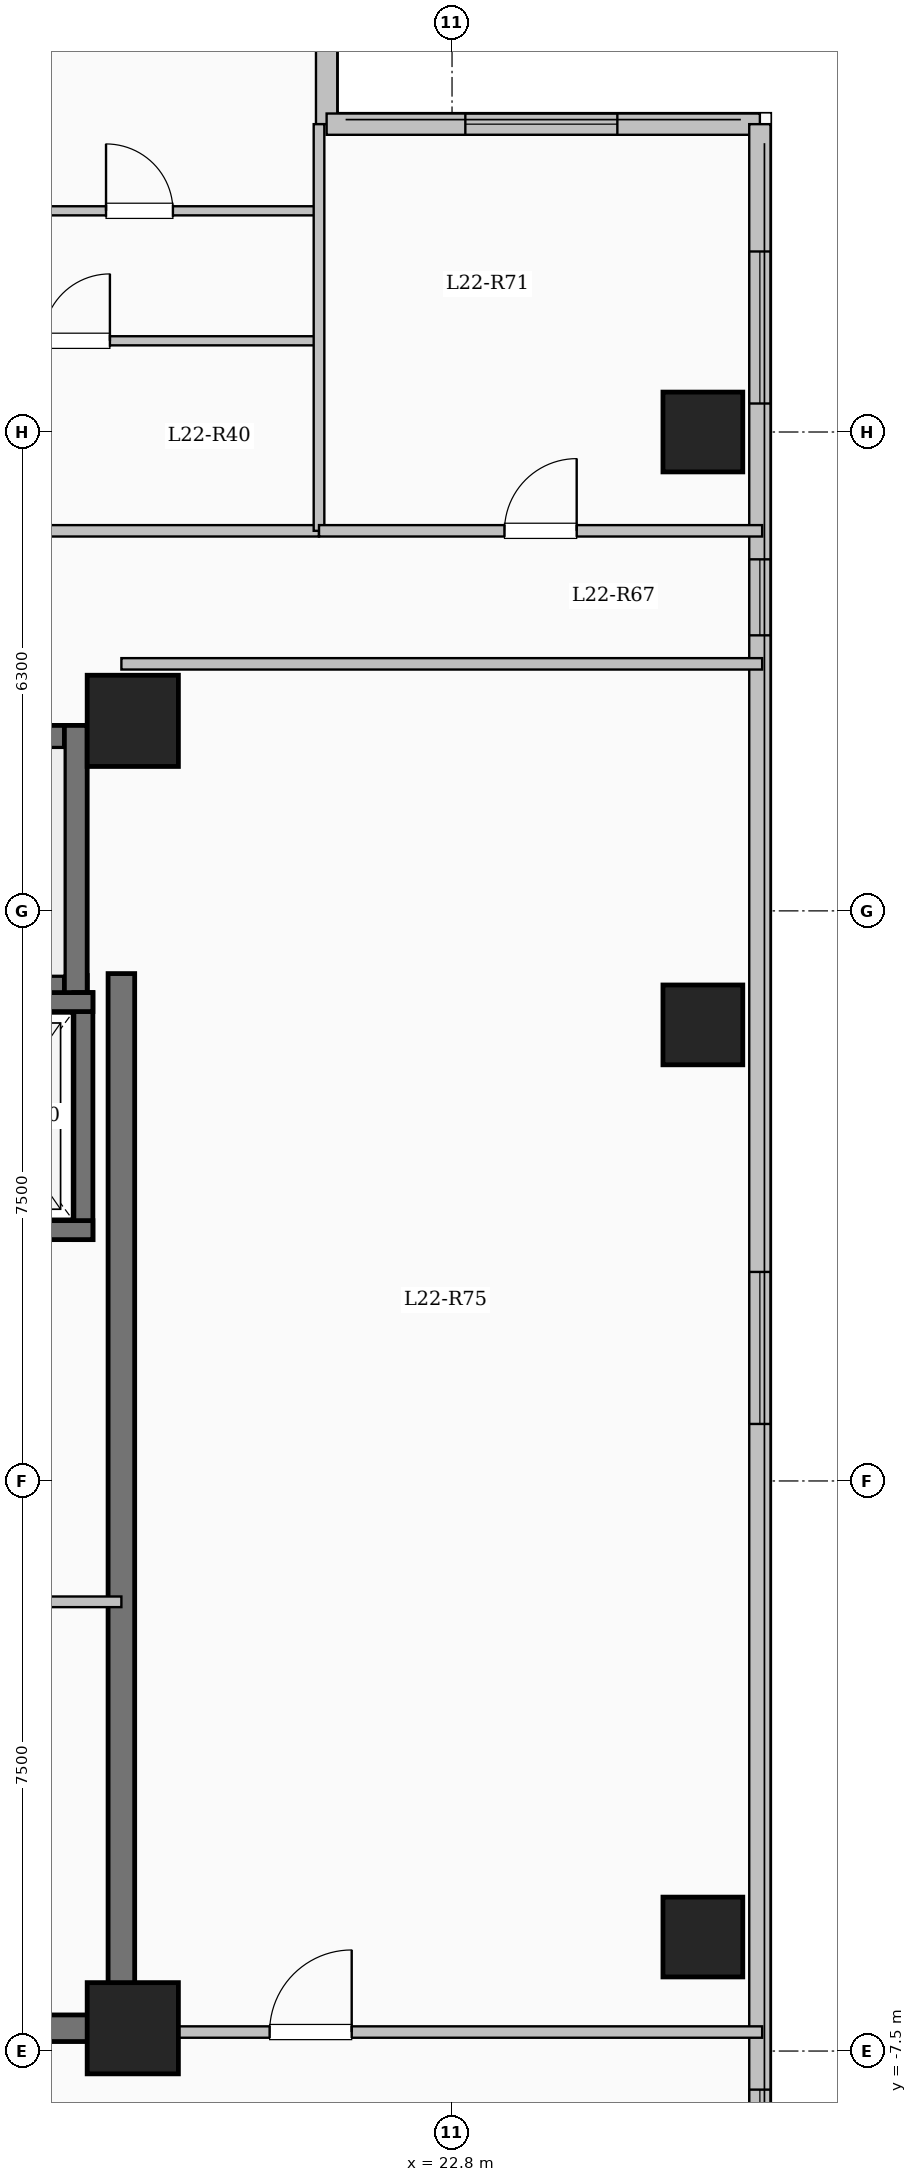
"""IFC4 building model, lengths in metres.
Left out: names, types, materials, properties, quantities, classifications, styles, units other than length and angle.
Written with IfcOpenShell. Run it as: python <this file> out.ifc"""

import sys

from ifc_helpers import new_model, si_unit, direction, frame, frame_2d, origin, origin_2d, place, context, subcontext, project, spatial, rectangle, extrude, element, fill, save


model = new_model("IFC4")
c1 = context("Model", 3, precision=1e-05, world=origin(), true_north=direction((0.0, 1.0)))
c2 = subcontext(c1, "Body", "Model", "MODEL_VIEW")
j1 = project(units=[si_unit("LENGTHUNIT", "METRE"), si_unit("PLANEANGLEUNIT", "RADIAN")], contexts=[c1])
p1 = place(None, origin())
s1 = spatial("IfcSite", under=j1, at=p1, CompositionType="ELEMENT")
p2 = place(p1, origin())
s2 = spatial("IfcBuilding", under=s1, at=p2, CompositionType="ELEMENT")
p3 = place(p2, frame((0.0, 0.0, 85.0)))
s3 = spatial("IfcBuildingStorey", under=s2, at=p3, CompositionType="ELEMENT", Elevation=85.0)
for number, where, z_axis, x_axis in (
    (1, (18.6, -7.2, 0.0), (0.0, 0.0, 1.0), (1.0, 0.0, 0.0)),
    (2, (18.6, 10.0, 0.0), (0.0, 0.0, 1.0), (1.0, 0.0, 0.0)),
):
    element("IfcColumn", number, at=place(p3, frame(where, z_axis=z_axis, x_axis=x_axis)), inside=s3, PredefinedType="COLUMN", context=c2, shape_type="SweptSolid", body=[
        extrude(rectangle(XDim=1.2, YDim=1.2, at=origin_2d()), origin(), (0.0, 0.0, 1.0), 3.35),
    ])
for number, where, z_axis, x_axis in (
    (3, (26.1, -6.0, 0.0), (0.0, 0.0, 1.0), (1.0, 0.0, 0.0)),
    (4, (26.1, 6.0, 0.0), (0.0, 0.0, 1.0), (1.0, 0.0, 0.0)),
    (5, (26.1, 13.8, 0.0), (0.0, 0.0, 1.0), (1.0, 0.0, 0.0)),
):
    element("IfcColumn", number, at=place(p3, frame(where, z_axis=z_axis, x_axis=x_axis)), inside=s3, PredefinedType="COLUMN", context=c2, shape_type="SweptSolid", body=[
        extrude(rectangle(XDim=1.05, YDim=1.05, at=origin_2d()), origin(), (0.0, 0.0, 1.0), 3.35),
    ])
p4 = place(p3, frame((21.15, 22.05, 0.0), z_axis=(0.0, 0.0, 1.0), x_axis=(0.0, -1.0, 0.0)))
e6 = element("IfcWall", 6, at=p4, inside=s3, PredefinedType="SOLIDWALL", context=c2, shape_type="SweptSolid", body=[
    extrude(rectangle(XDim=4.2, YDim=0.28, at=frame_2d((2.1, 0.0))), origin(), (0.0, 0.0, 1.0), 3.1),
])
p5 = place(p4, frame((1.218, 0.0, 0.9)))
e7 = element("IfcOpeningElement", 7, at=p5, cuts=e6, PredefinedType="OPENING", context=c2, shape_type="SweptSolid", body=[
    extrude(rectangle(XDim=1.8, YDim=1.65, at=frame_2d((0.9, 0.825))), frame((0.0, 0.15, 0.0), z_axis=(0.0, -1.0, 0.0), x_axis=(1.0, 0.0, 0.0)), (0.0, 0.0, 1.0), 0.3),
])
p6 = place(p3, frame((21.15, 17.85, 0.0), z_axis=(0.0, 0.0, 1.0), x_axis=(1.0, 0.0, 0.0)))
e8 = element("IfcWall", 8, at=p6, inside=s3, PredefinedType="SOLIDWALL", context=c2, shape_type="SweptSolid", body=[
    extrude(rectangle(XDim=5.7, YDim=0.28, at=frame_2d((2.85, 0.0))), origin(), (0.0, 0.0, 1.0), 3.1),
])
p7 = place(p6, frame((1.825, 0.0, 0.9)))
e9 = element("IfcOpeningElement", 9, at=p7, cuts=e8, PredefinedType="OPENING", context=c2, shape_type="SweptSolid", body=[
    extrude(rectangle(XDim=2.0, YDim=1.7, at=frame_2d((1.0, 0.85))), frame((0.0, 0.15, 0.0), z_axis=(0.0, -1.0, 0.0), x_axis=(1.0, 0.0, 0.0)), (0.0, 0.0, 1.0), 0.3),
])
p8 = place(p3, frame((26.85, 17.85, 0.0), z_axis=(0.0, 0.0, 1.0), x_axis=(0.0, -1.0, 0.0)))
e10 = element("IfcWall", 10, at=p8, inside=s3, PredefinedType="SOLIDWALL", context=c2, shape_type="SweptSolid", body=[
    extrude(rectangle(XDim=35.7, YDim=0.28, at=frame_2d((17.85, 0.0))), origin(), (0.0, 0.0, 1.0), 3.1),
])
p9 = place(p8, frame((1.675, 0.0, 0.9)))
e11 = element("IfcOpeningElement", 11, at=p9, cuts=e10, PredefinedType="OPENING", context=c2, shape_type="SweptSolid", body=[
    extrude(rectangle(XDim=2.0, YDim=1.7, at=frame_2d((1.0, 0.85))), frame((0.0, 0.15, 0.0), z_axis=(0.0, -1.0, 0.0), x_axis=(1.0, 0.0, 0.0)), (0.0, 0.0, 1.0), 0.3),
])
p10 = place(p8, frame((5.725, 0.0, 0.95)))
e12 = element("IfcOpeningElement", 12, at=p10, cuts=e10, PredefinedType="OPENING", context=c2, shape_type="SweptSolid", body=[
    extrude(rectangle(XDim=1.0, YDim=1.5, at=frame_2d((0.5, 0.75))), frame((0.0, 0.15, 0.0), z_axis=(0.0, -1.0, 0.0), x_axis=(1.0, 0.0, 0.0)), (0.0, 0.0, 1.0), 0.3),
])
p11 = place(p8, frame((15.1, 0.0, 0.9)))
e13 = element("IfcOpeningElement", 13, at=p11, cuts=e10, PredefinedType="OPENING", context=c2, shape_type="SweptSolid", body=[
    extrude(rectangle(XDim=2.0, YDim=1.7, at=frame_2d((1.0, 0.85))), frame((0.0, 0.15, 0.0), z_axis=(0.0, -1.0, 0.0), x_axis=(1.0, 0.0, 0.0)), (0.0, 0.0, 1.0), 0.3),
])
p12 = place(p8, frame((25.857, 0.0, 0.9)))
e14 = element("IfcOpeningElement", 14, at=p12, cuts=e10, PredefinedType="OPENING", context=c2, shape_type="SweptSolid", body=[
    extrude(rectangle(XDim=1.5, YDim=1.65, at=frame_2d((0.75, 0.825))), frame((0.0, 0.15, 0.0), z_axis=(0.0, -1.0, 0.0), x_axis=(1.0, 0.0, 0.0)), (0.0, 0.0, 1.0), 0.3),
])
p13 = place(p8, frame((30.75, 0.0, 0.9)))
e15 = element("IfcOpeningElement", 15, at=p13, cuts=e10, PredefinedType="OPENING", context=c2, shape_type="SweptSolid", body=[
    extrude(rectangle(XDim=2.4, YDim=1.8, at=frame_2d((1.2, 0.9))), frame((0.0, 0.15, 0.0), z_axis=(0.0, -1.0, 0.0), x_axis=(1.0, 0.0, 0.0)), (0.0, 0.0, 1.0), 0.3),
])
p14 = place(p3, frame((10.0, 9.79, 0.0), z_axis=(0.0, 0.0, 1.0), x_axis=(1.0, 0.0, 0.0)))
e16 = element("IfcWall", 16, at=p14, inside=s3, PredefinedType="SHEAR", context=c2, shape_type="SweptSolid", body=[
    extrude(rectangle(XDim=8.0, YDim=0.3, at=frame_2d((4.0, 0.0))), origin(), (0.0, 0.0, 1.0), 3.35),
])
p15 = place(p3, frame((10.0, 6.5, 0.0), z_axis=(0.0, 0.0, 1.0), x_axis=(1.0, 0.0, 0.0)))
e17 = element("IfcWall", 17, at=p15, inside=s3, PredefinedType="SHEAR", context=c2, shape_type="SweptSolid", body=[
    extrude(rectangle(XDim=8.0, YDim=0.3, at=frame_2d((4.0, 0.0))), origin(), (0.0, 0.0, 1.0), 3.35),
])
p16 = place(p15, frame((0.55, 0.0, 0.0)))
e18 = element("IfcOpeningElement", 18, at=p16, cuts=e17, PredefinedType="OPENING", context=c2, shape_type="SweptSolid", body=[
    extrude(rectangle(XDim=1.0, YDim=2.15, at=frame_2d((0.5, 1.075))), frame((0.0, 0.16, 0.0), z_axis=(0.0, -1.0, 0.0), x_axis=(1.0, 0.0, 0.0)), (0.0, 0.0, 1.0), 0.32),
])
p17 = place(p3, frame((17.85, 6.35, 0.0), z_axis=(0.0, 0.0, 1.0), x_axis=(0.0, 1.0, 0.0)))
e19 = element("IfcWall", 19, at=p17, inside=s3, PredefinedType="SHEAR", context=c2, shape_type="SweptSolid", body=[
    extrude(rectangle(XDim=3.59, YDim=0.3, at=frame_2d((1.795, 0.0))), origin(), (0.0, 0.0, 1.0), 3.35),
])
p18 = place(p3, frame((17.95, 3.175, 0.0), z_axis=(0.0, 0.0, 1.0), x_axis=(0.0, 1.0, 0.0)))
e20 = element("IfcWall", 20, at=p18, inside=s3, PredefinedType="SHEAR", context=c2, shape_type="SweptSolid", body=[
    extrude(rectangle(XDim=3.25, YDim=0.25, at=frame_2d((1.625, 0.0))), origin(), (0.0, 0.0, 1.0), 3.35),
])
for number, where, z_axis, x_axis in (
    (21, (15.525, 3.3, 0.0), (0.0, 0.0, 1.0), (1.0, 0.0, 0.0)),
    (22, (15.525, 6.3, 0.0), (0.0, 0.0, 1.0), (1.0, 0.0, 0.0)),
):
    element("IfcWall", number, at=place(p3, frame(where, z_axis=z_axis, x_axis=x_axis)), inside=s3, PredefinedType="SHEAR", context=c2, shape_type="SweptSolid", body=[
        extrude(rectangle(XDim=2.55, YDim=0.25, at=frame_2d((1.275, 0.0))), origin(), (0.0, 0.0, 1.0), 3.35),
    ])
p19 = place(p3, frame((18.45, -7.375, 0.0), z_axis=(0.0, 0.0, 1.0), x_axis=(0.0, 1.0, 0.0)))
e23 = element("IfcWall", 23, at=p19, inside=s3, PredefinedType="SHEAR", context=c2, shape_type="SweptSolid", body=[
    extrude(rectangle(XDim=14.05, YDim=0.35, at=frame_2d((7.025, 0.0))), origin(), (0.0, 0.0, 1.0), 3.35),
])
p20 = place(p3, frame((10.075, -7.2, 0.0), z_axis=(0.0, 0.0, 1.0), x_axis=(1.0, 0.0, 0.0)))
e24 = element("IfcWall", 24, at=p20, inside=s3, PredefinedType="SHEAR", context=c2, shape_type="SweptSolid", body=[
    extrude(rectangle(XDim=8.55, YDim=0.35, at=frame_2d((4.275, 0.0))), origin(), (0.0, 0.0, 1.0), 3.35),
])
p21 = place(p3, frame((15.4, -1.59, 0.0), z_axis=(0.0, 0.0, 1.0), x_axis=(1.0, 0.0, 0.0)))
e25 = element("IfcWall", 25, at=p21, inside=s3, PredefinedType="PARTITIONING", context=c2, shape_type="SweptSolid", body=[
    extrude(rectangle(XDim=3.05, YDim=0.14, at=frame_2d((1.525, 0.0))), origin(), (0.0, 0.0, 1.0), 3.1),
])
p22 = place(p21, frame((1.05, 0.0, 0.0)))
e26 = element("IfcOpeningElement", 26, at=p22, cuts=e25, PredefinedType="OPENING", context=c2, shape_type="SweptSolid", body=[
    extrude(rectangle(XDim=0.9, YDim=2.08, at=frame_2d((0.45, 1.04))), frame((0.0, 0.08, 0.0), z_axis=(0.0, -1.0, 0.0), x_axis=(1.0, 0.0, 0.0)), (0.0, 0.0, 1.0), 0.16),
])
p23 = place(p3, frame((3.85, 12.5, 0.0), z_axis=(0.0, 0.0, 1.0), x_axis=(1.0, 0.0, 0.0)))
e27 = element("IfcWall", 27, at=p23, inside=s3, PredefinedType="PARTITIONING", context=c2, shape_type="SweptSolid", body=[
    extrude(rectangle(XDim=17.2, YDim=0.15, at=frame_2d((8.6, 0.0))), origin(), (0.0, 0.0, 1.0), 3.1),
])
p24 = place(p23, frame((0.7, 0.0, 0.0)))
e28 = element("IfcOpeningElement", 28, at=p24, cuts=e27, PredefinedType="OPENING", context=c2, shape_type="SweptSolid", body=[
    extrude(rectangle(XDim=0.96, YDim=2.15, at=frame_2d((0.48, 1.075))), frame((0.0, 0.085, 0.0), z_axis=(0.0, -1.0, 0.0), x_axis=(1.0, 0.0, 0.0)), (0.0, 0.0, 1.0), 0.17),
])
p25 = place(p3, frame((14.668, 15.0, 0.0), z_axis=(0.0, 0.0, 1.0), x_axis=(1.0, 0.0, 0.0)))
e29 = element("IfcWall", 29, at=p25, inside=s3, PredefinedType="PARTITIONING", context=c2, shape_type="SweptSolid", body=[
    extrude(rectangle(XDim=6.382, YDim=0.12, at=frame_2d((3.191, 0.0))), origin(), (0.0, 0.0, 1.0), 3.1),
])
p26 = place(p25, frame((2.751, 0.0, 0.0)))
e30 = element("IfcOpeningElement", 30, at=p26, cuts=e29, PredefinedType="OPENING", context=c2, shape_type="SweptSolid", body=[
    extrude(rectangle(XDim=0.88, YDim=2.1, at=frame_2d((0.44, 1.05))), frame((0.0, 0.07, 0.0), z_axis=(0.0, -1.0, 0.0), x_axis=(1.0, 0.0, 0.0)), (0.0, 0.0, 1.0), 0.14),
])
p27 = place(p3, frame((7.479, 16.71, 0.0), z_axis=(0.0, 0.0, 1.0), x_axis=(1.0, 0.0, 0.0)))
e31 = element("IfcWall", 31, at=p27, inside=s3, PredefinedType="PARTITIONING", context=c2, shape_type="SweptSolid", body=[
    extrude(rectangle(XDim=13.631, YDim=0.12, at=frame_2d((6.815, 0.0))), origin(), (0.0, 0.0, 1.0), 3.1),
])
p28 = place(p27, frame((1.802, 0.0, 0.0)))
e32 = element("IfcOpeningElement", 32, at=p28, cuts=e31, PredefinedType="OPENING", context=c2, shape_type="SweptSolid", body=[
    extrude(rectangle(XDim=0.88, YDim=2.1, at=frame_2d((0.44, 1.05))), frame((0.0, 0.07, 0.0), z_axis=(0.0, -1.0, 0.0), x_axis=(1.0, 0.0, 0.0)), (0.0, 0.0, 1.0), 0.14),
])
p29 = place(p27, frame((6.286, 0.0, 0.0)))
e33 = element("IfcOpeningElement", 33, at=p29, cuts=e31, PredefinedType="OPENING", context=c2, shape_type="SweptSolid", body=[
    extrude(rectangle(XDim=0.88, YDim=2.1, at=frame_2d((0.44, 1.05))), frame((0.0, 0.07, 0.0), z_axis=(0.0, -1.0, 0.0), x_axis=(1.0, 0.0, 0.0)), (0.0, 0.0, 1.0), 0.14),
])
p30 = place(p27, frame((10.769, 0.0, 0.0)))
e34 = element("IfcOpeningElement", 34, at=p30, cuts=e31, PredefinedType="OPENING", context=c2, shape_type="SweptSolid", body=[
    extrude(rectangle(XDim=0.88, YDim=2.1, at=frame_2d((0.44, 1.05))), frame((0.0, 0.07, 0.0), z_axis=(0.0, -1.0, 0.0), x_axis=(1.0, 0.0, 0.0)), (0.0, 0.0, 1.0), 0.14),
])
p31 = place(p3, frame((18.45, -7.25, 0.0), z_axis=(0.0, 0.0, 1.0), x_axis=(1.0, 0.0, 0.0)))
e35 = element("IfcWall", 35, at=p31, inside=s3, PredefinedType="PARTITIONING", context=c2, shape_type="SweptSolid", body=[
    extrude(rectangle(XDim=8.43, YDim=0.15, at=frame_2d((4.215, 0.0))), origin(), (0.0, 0.0, 1.0), 3.1),
])
p32 = place(p31, frame((1.95, 0.0, 0.0)))
e36 = element("IfcOpeningElement", 36, at=p32, cuts=e35, PredefinedType="OPENING", context=c2, shape_type="SweptSolid", body=[
    extrude(rectangle(XDim=1.08, YDim=2.15, at=frame_2d((0.54, 1.075))), frame((0.0, 0.085, 0.0), z_axis=(0.0, -1.0, 0.0), x_axis=(1.0, 0.0, 0.0)), (0.0, 0.0, 1.0), 0.17),
])
p33 = place(p3, frame((18.45, 10.75, 0.0), z_axis=(0.0, 0.0, 1.0), x_axis=(1.0, 0.0, 0.0)))
e37 = element("IfcWall", 37, at=p33, inside=s3, PredefinedType="PARTITIONING", context=c2, shape_type="SweptSolid", body=[
    extrude(rectangle(XDim=8.43, YDim=0.15, at=frame_2d((4.215, 0.0))), origin(), (0.0, 0.0, 1.0), 3.1),
])
p34 = place(p3, frame((21.05, 12.5, 0.0), z_axis=(0.0, 0.0, 1.0), x_axis=(0.0, 1.0, 0.0)))
e38 = element("IfcWall", 38, at=p34, inside=s3, PredefinedType="PARTITIONING", context=c2, shape_type="SweptSolid", body=[
    extrude(rectangle(XDim=5.35, YDim=0.14, at=frame_2d((2.675, 0.0))), origin(), (0.0, 0.0, 1.0), 3.1),
])
p35 = place(p3, frame((21.05, 12.5, 0.0), z_axis=(0.0, 0.0, 1.0), x_axis=(1.0, 0.0, 0.0)))
e39 = element("IfcWall", 39, at=p35, inside=s3, PredefinedType="PARTITIONING", context=c2, shape_type="SweptSolid", body=[
    extrude(rectangle(XDim=5.83, YDim=0.15, at=frame_2d((2.915, 0.0))), origin(), (0.0, 0.0, 1.0), 3.1),
])
p36 = place(p35, frame((2.44, 0.0, 0.0)))
e40 = element("IfcOpeningElement", 40, at=p36, cuts=e39, PredefinedType="OPENING", context=c2, shape_type="SweptSolid", body=[
    extrude(rectangle(XDim=0.95, YDim=2.15, at=frame_2d((0.475, 1.075))), frame((0.0, 0.085, 0.0), z_axis=(0.0, -1.0, 0.0), x_axis=(1.0, 0.0, 0.0)), (0.0, 0.0, 1.0), 0.17),
])
p37 = place(p7, origin())
e41 = element("IfcWindow", 41, at=p37, inside=s3, PartitioningType="SINGLE_PANEL", PredefinedType="WINDOW", context=c2, shape_type="SweptSolid", body=[
    extrude(rectangle(XDim=2.0, YDim=1.7, at=frame_2d((1.0, 0.85))), frame((0.0, 0.03, 0.0), z_axis=(0.0, -1.0, 0.0), x_axis=(1.0, 0.0, 0.0)), (0.0, 0.0, 1.0), 0.06),
])
fill(e9, e41)
p38 = place(p9, origin())
e42 = element("IfcWindow", 42, at=p38, inside=s3, PartitioningType="SINGLE_PANEL", PredefinedType="WINDOW", context=c2, shape_type="SweptSolid", body=[
    extrude(rectangle(XDim=2.0, YDim=1.7, at=frame_2d((1.0, 0.85))), frame((0.0, 0.03, 0.0), z_axis=(0.0, -1.0, 0.0), x_axis=(1.0, 0.0, 0.0)), (0.0, 0.0, 1.0), 0.06),
])
fill(e11, e42)
p39 = place(p10, origin())
e43 = element("IfcWindow", 43, at=p39, inside=s3, PartitioningType="SINGLE_PANEL", PredefinedType="WINDOW", context=c2, shape_type="SweptSolid", body=[
    extrude(rectangle(XDim=1.0, YDim=1.5, at=frame_2d((0.5, 0.75))), frame((0.0, 0.03, 0.0), z_axis=(0.0, -1.0, 0.0), x_axis=(1.0, 0.0, 0.0)), (0.0, 0.0, 1.0), 0.06),
])
fill(e12, e43)
p40 = place(p11, origin())
e44 = element("IfcWindow", 44, at=p40, inside=s3, PartitioningType="SINGLE_PANEL", PredefinedType="WINDOW", context=c2, shape_type="SweptSolid", body=[
    extrude(rectangle(XDim=2.0, YDim=1.7, at=frame_2d((1.0, 0.85))), frame((0.0, 0.03, 0.0), z_axis=(0.0, -1.0, 0.0), x_axis=(1.0, 0.0, 0.0)), (0.0, 0.0, 1.0), 0.06),
])
fill(e13, e44)
p41 = place(p12, origin())
e45 = element("IfcWindow", 45, at=p41, inside=s3, PartitioningType="SINGLE_PANEL", PredefinedType="WINDOW", context=c2, shape_type="SweptSolid", body=[
    extrude(rectangle(XDim=1.5, YDim=1.65, at=frame_2d((0.75, 0.825))), frame((0.0, 0.03, 0.0), z_axis=(0.0, -1.0, 0.0), x_axis=(1.0, 0.0, 0.0)), (0.0, 0.0, 1.0), 0.06),
])
fill(e14, e45)
p42 = place(p26, origin())
e46 = element("IfcDoor", 46, at=p42, inside=s3, OperationType="SINGLE_SWING_RIGHT", PredefinedType="DOOR", context=c2, shape_type="SweptSolid", body=[
    extrude(rectangle(XDim=0.88, YDim=2.1, at=frame_2d((0.44, 1.05))), frame((0.0, 0.025, 0.0), z_axis=(0.0, -1.0, 0.0), x_axis=(1.0, 0.0, 0.0)), (0.0, 0.0, 1.0), 0.05),
])
fill(e30, e46)
p43 = place(p30, origin())
e47 = element("IfcDoor", 47, at=p43, inside=s3, OperationType="SINGLE_SWING_LEFT", PredefinedType="DOOR", context=c2, shape_type="SweptSolid", body=[
    extrude(rectangle(XDim=0.88, YDim=2.1, at=frame_2d((0.44, 1.05))), frame((0.0, 0.025, 0.0), z_axis=(0.0, -1.0, 0.0), x_axis=(1.0, 0.0, 0.0)), (0.0, 0.0, 1.0), 0.05),
])
fill(e34, e47)
p44 = place(p36, origin())
e48 = element("IfcDoor", 48, at=p44, inside=s3, OperationType="SINGLE_SWING_RIGHT", PredefinedType="DOOR", context=c2, shape_type="SweptSolid", body=[
    extrude(rectangle(XDim=0.95, YDim=2.15, at=frame_2d((0.475, 1.075))), frame((0.0, 0.025, 0.0), z_axis=(0.0, -1.0, 0.0), x_axis=(1.0, 0.0, 0.0)), (0.0, 0.0, 1.0), 0.05),
])
fill(e40, e48)
p45 = place(p32, origin())
e49 = element("IfcDoor", 49, at=p45, inside=s3, OperationType="SINGLE_SWING_RIGHT", PredefinedType="DOOR", context=c2, shape_type="SweptSolid", body=[
    extrude(rectangle(XDim=1.08, YDim=2.15, at=frame_2d((0.54, 1.075))), frame((0.0, 0.025, 0.0), z_axis=(0.0, -1.0, 0.0), x_axis=(1.0, 0.0, 0.0)), (0.0, 0.0, 1.0), 0.05),
])
fill(e36, e49)
save(model, sys.argv[1])
